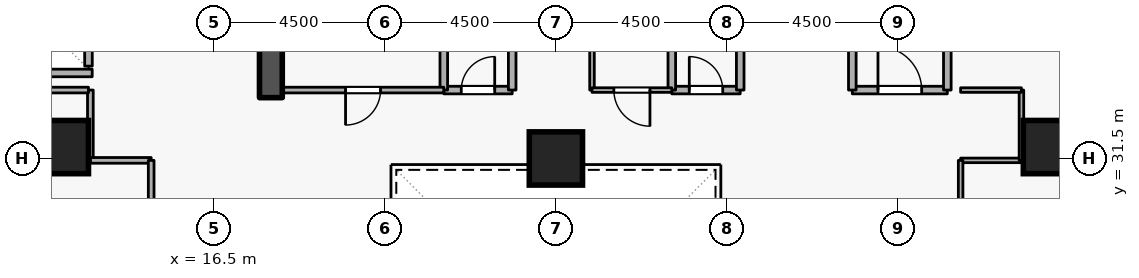
"""IFC4 building model, lengths in metres.
Left out: names, types, materials, properties, quantities, classifications, styles, units other than length and angle.
Written with IfcOpenShell. Run it as: python <this file> out.ifc"""

import sys

from ifc_helpers import new_model, si_unit, direction, frame, frame_2d, origin, origin_2d, place, context, subcontext, project, spatial, rectangle, extrude, element, fill, save


model = new_model("IFC4")
c1 = context("Model", 3, precision=1e-05, world=origin(), true_north=direction((0.0, 1.0)))
c2 = subcontext(c1, "Body", "Model", "MODEL_VIEW")
j1 = project(units=[si_unit("LENGTHUNIT", "METRE"), si_unit("PLANEANGLEUNIT", "RADIAN")], contexts=[c1])
p1 = place(None, origin())
s1 = spatial("IfcSite", under=j1, at=p1, CompositionType="ELEMENT")
p2 = place(p1, origin())
s2 = spatial("IfcBuilding", under=s1, at=p2, CompositionType="ELEMENT")
p3 = place(p2, frame((0.0, 0.0, 31.5)))
s3 = spatial("IfcBuildingStorey", under=s2, at=p3, CompositionType="ELEMENT", Elevation=31.5)
p4 = place(p3, frame((18.0, 33.1, 0.0), z_axis=(0.0, 0.0, 1.0), x_axis=(0.0, 1.0, 0.0)))
e1 = element("IfcWall", 1, at=p4, inside=s3, PredefinedType="SHEAR", context=c2, shape_type="SweptSolid", body=[
    extrude(rectangle(XDim=5.7, YDim=0.6, at=frame_2d((2.85, 0.0))), origin(), (0.0, 0.0, 1.0), 3.6),
])
for number, where, z_axis, x_axis in (
    (2, (12.5, 31.8, 0.0), (0.0, 0.0, 1.0), (1.0, 0.0, 0.0)),
    (3, (38.5, 31.8, 0.0), (0.0, 0.0, 1.0), (1.0, 0.0, 0.0)),
    (4, (25.5, 31.5, 0.0), (0.0, 0.0, 1.0), (1.0, 0.0, 0.0)),
):
    element("IfcColumn", number, at=place(p3, frame(where, z_axis=z_axis, x_axis=x_axis)), inside=s3, PredefinedType="COLUMN", context=c2, shape_type="SweptSolid", body=[
        extrude(rectangle(XDim=1.4, YDim=1.4, at=origin_2d()), origin(), (0.0, 0.0, 1.0), 3.6),
    ])
p5 = place(p3, frame((13.2, 33.93, 0.0), z_axis=(0.0, 0.0, 1.0), x_axis=(0.0, 1.0, 0.0)))
e5 = element("IfcWall", 5, at=p5, inside=s3, PredefinedType="STANDARD", context=c2, shape_type="SweptSolid", body=[
    extrude(rectangle(XDim=1.94, YDim=0.2, at=frame_2d((0.97, 0.0))), origin(), (0.0, 0.0, 1.0), 3.34),
])
p6 = place(p3, frame((11.002, 33.75, 0.0), z_axis=(0.0, 0.0, 1.0), x_axis=(1.0, 0.0, 0.0)))
e6 = element("IfcWall", 6, at=p6, inside=s3, PredefinedType="STANDARD", context=c2, shape_type="SweptSolid", body=[
    extrude(rectangle(XDim=2.296, YDim=0.2, at=frame_2d((1.148, 0.0))), origin(), (0.0, 0.0, 1.0), 3.34),
])
p7 = place(p3, frame((33.3, 33.3, 0.0), z_axis=(0.0, 0.0, 1.0), x_axis=(1.0, 0.0, 0.0)))
e7 = element("IfcWall", 7, at=p7, inside=s3, PredefinedType="STANDARD", context=c2, shape_type="SweptSolid", body=[
    extrude(rectangle(XDim=2.5, YDim=0.2, at=frame_2d((1.25, 0.0))), origin(), (0.0, 0.0, 1.0), 3.34),
])
p8 = place(p7, frame((0.675, 0.0, 0.0)))
e8 = element("IfcOpeningElement", 8, at=p8, cuts=e7, PredefinedType="OPENING", context=c2, shape_type="SweptSolid", body=[
    extrude(rectangle(XDim=1.15, YDim=2.1, at=frame_2d((0.575, 1.05))), frame((0.0, 0.11, 0.0), z_axis=(0.0, -1.0, 0.0), x_axis=(1.0, 0.0, 0.0)), (0.0, 0.0, 1.0), 0.22),
])
p9 = place(p3, frame((35.8, 33.3, 0.0), z_axis=(0.0, 0.0, 1.0), x_axis=(0.0, 1.0, 0.0)))
e9 = element("IfcWall", 9, at=p9, inside=s3, PredefinedType="STANDARD", context=c2, shape_type="SweptSolid", body=[
    extrude(rectangle(XDim=5.7, YDim=0.2, at=frame_2d((2.85, 0.0))), origin(), (0.0, 0.0, 1.0), 3.34),
])
p10 = place(p3, frame((33.3, 35.6, 0.0), z_axis=(0.0, 0.0, 1.0), x_axis=(0.0, -1.0, 0.0)))
e10 = element("IfcWall", 10, at=p10, inside=s3, PredefinedType="STANDARD", context=c2, shape_type="SweptSolid", body=[
    extrude(rectangle(XDim=2.3, YDim=0.2, at=frame_2d((1.15, 0.0))), origin(), (0.0, 0.0, 1.0), 2.545),
])
p11 = place(p3, frame((22.55, 33.3, 0.0), z_axis=(0.0, 0.0, 1.0), x_axis=(1.0, 0.0, 0.0)))
e11 = element("IfcWall", 11, at=p11, inside=s3, PredefinedType="STANDARD", context=c2, shape_type="SweptSolid", body=[
    extrude(rectangle(XDim=1.8, YDim=0.2, at=frame_2d((0.9, 0.0))), origin(), (0.0, 0.0, 1.0), 3.34),
])
p12 = place(p11, frame((0.46, 0.0, 0.0)))
e12 = element("IfcOpeningElement", 12, at=p12, cuts=e11, PredefinedType="OPENING", context=c2, shape_type="SweptSolid", body=[
    extrude(rectangle(XDim=0.88, YDim=2.04, at=frame_2d((0.44, 1.02))), frame((0.0, 0.11, 0.0), z_axis=(0.0, -1.0, 0.0), x_axis=(1.0, 0.0, 0.0)), (0.0, 0.0, 1.0), 0.22),
])
for number, where, z_axis, x_axis in (
    (13, (24.35, 33.3, 0.0), (0.0, 0.0, 1.0), (0.0, 1.0, 0.0)),
    (14, (22.55, 35.35, 0.0), (0.0, 0.0, 1.0), (0.0, -1.0, 0.0)),
):
    element("IfcWall", number, at=place(p3, frame(where, z_axis=z_axis, x_axis=x_axis)), inside=s3, PredefinedType="STANDARD", context=c2, shape_type="SweptSolid", body=[
        extrude(rectangle(XDim=2.05, YDim=0.2, at=frame_2d((1.025, 0.0))), origin(), (0.0, 0.0, 1.0), 3.34),
    ])
p13 = place(p3, frame((28.55, 33.3, 0.0), z_axis=(0.0, 0.0, 1.0), x_axis=(1.0, 0.0, 0.0)))
e15 = element("IfcWall", 15, at=p13, inside=s3, PredefinedType="STANDARD", context=c2, shape_type="SweptSolid", body=[
    extrude(rectangle(XDim=1.8, YDim=0.2, at=frame_2d((0.9, 0.0))), origin(), (0.0, 0.0, 1.0), 3.34),
])
p14 = place(p13, frame((0.46, 0.0, 0.0)))
e16 = element("IfcOpeningElement", 16, at=p14, cuts=e15, PredefinedType="OPENING", context=c2, shape_type="SweptSolid", body=[
    extrude(rectangle(XDim=0.88, YDim=2.04, at=frame_2d((0.44, 1.02))), frame((0.0, 0.11, 0.0), z_axis=(0.0, -1.0, 0.0), x_axis=(1.0, 0.0, 0.0)), (0.0, 0.0, 1.0), 0.22),
])
for number, where, z_axis, x_axis in (
    (17, (30.35, 33.3, 0.0), (0.0, 0.0, 1.0), (0.0, 1.0, 0.0)),
    (18, (28.55, 35.35, 0.0), (0.0, 0.0, 1.0), (0.0, -1.0, 0.0)),
):
    element("IfcWall", number, at=place(p3, frame(where, z_axis=z_axis, x_axis=x_axis)), inside=s3, PredefinedType="STANDARD", context=c2, shape_type="SweptSolid", body=[
        extrude(rectangle(XDim=2.05, YDim=0.2, at=frame_2d((1.025, 0.0))), origin(), (0.0, 0.0, 1.0), 3.34),
    ])
p15 = place(p3, frame((22.55, 33.3, 0.0), z_axis=(0.0, 0.0, 1.0), x_axis=(-1.0, 0.0, 0.0)))
e19 = element("IfcWall", 19, at=p15, inside=s3, PredefinedType="PARTITIONING", context=c2, shape_type="SweptSolid", body=[
    extrude(rectangle(XDim=4.25, YDim=0.15, at=frame_2d((2.125, 0.0))), origin(), (0.0, 0.0, 1.0), 3.34),
])
p16 = place(p15, frame((1.665, 0.0, 0.0)))
e20 = element("IfcOpeningElement", 20, at=p16, cuts=e19, PredefinedType="OPENING", context=c2, shape_type="SweptSolid", body=[
    extrude(rectangle(XDim=0.92, YDim=2.08, at=frame_2d((0.46, 1.04))), frame((0.0, 0.085, 0.0), z_axis=(0.0, -1.0, 0.0), x_axis=(1.0, 0.0, 0.0)), (0.0, 0.0, 1.0), 0.17),
])
p17 = place(p3, frame((26.45, 33.3, 0.0), z_axis=(0.0, 0.0, 1.0), x_axis=(0.0, 1.0, 0.0)))
e21 = element("IfcWall", 21, at=p17, inside=s3, PredefinedType="PARTITIONING", context=c2, shape_type="SweptSolid", body=[
    extrude(rectangle(XDim=2.05, YDim=0.12, at=frame_2d((1.025, 0.0))), origin(), (0.0, 0.0, 1.0), 3.34),
])
p18 = place(p3, frame((28.55, 33.3, 0.0), z_axis=(0.0, 0.0, 1.0), x_axis=(-1.0, 0.0, 0.0)))
e22 = element("IfcWall", 22, at=p18, inside=s3, PredefinedType="PARTITIONING", context=c2, shape_type="SweptSolid", body=[
    extrude(rectangle(XDim=2.1, YDim=0.12, at=frame_2d((1.05, 0.0))), origin(), (0.0, 0.0, 1.0), 3.34),
])
p19 = place(p18, frame((0.575, 0.0, 0.0)))
e23 = element("IfcOpeningElement", 23, at=p19, cuts=e22, PredefinedType="OPENING", context=c2, shape_type="SweptSolid", body=[
    extrude(rectangle(XDim=0.95, YDim=2.1, at=frame_2d((0.475, 1.05))), frame((0.0, 0.07, 0.0), z_axis=(0.0, -1.0, 0.0), x_axis=(1.0, 0.0, 0.0)), (0.0, 0.0, 1.0), 0.14),
])
p20 = place(p3, frame((13.25, 33.3, 0.0), z_axis=(0.0, 0.0, 1.0), x_axis=(0.0, -1.0, 0.0)))
e24 = element("IfcWall", 24, at=p20, inside=s3, PredefinedType="PARTITIONING", context=c2, shape_type="SweptSolid", body=[
    extrude(rectangle(XDim=1.85, YDim=0.15, at=frame_2d((0.925, 0.0))), origin(), (0.0, 0.0, 1.0), 3.34),
])
p21 = place(p3, frame((13.25, 31.45, 0.0), z_axis=(0.0, 0.0, 1.0), x_axis=(1.0, 0.0, 0.0)))
e25 = element("IfcWall", 25, at=p21, inside=s3, PredefinedType="PARTITIONING", context=c2, shape_type="SweptSolid", body=[
    extrude(rectangle(XDim=1.6, YDim=0.15, at=frame_2d((0.8, 0.0))), origin(), (0.0, 0.0, 1.0), 3.34),
])
p22 = place(p3, frame((14.85, 31.45, 0.0), z_axis=(0.0, 0.0, 1.0), x_axis=(0.0, -1.0, 0.0)))
e26 = element("IfcWall", 26, at=p22, inside=s3, PredefinedType="PARTITIONING", context=c2, shape_type="SweptSolid", body=[
    extrude(rectangle(XDim=4.45, YDim=0.15, at=frame_2d((2.225, 0.0))), origin(), (0.0, 0.0, 1.0), 3.34),
])
p23 = place(p22, frame((1.575, 0.0, 0.0)))
e27 = element("IfcOpeningElement", 27, at=p23, cuts=e26, PredefinedType="OPENING", context=c2, shape_type="SweptSolid", body=[
    extrude(rectangle(XDim=1.3, YDim=2.12, at=frame_2d((0.65, 1.06))), frame((0.0, 0.085, 0.0), z_axis=(0.0, -1.0, 0.0), x_axis=(1.0, 0.0, 0.0)), (0.0, 0.0, 1.0), 0.17),
])
p24 = place(p3, frame((10.9, 33.3, 0.0), z_axis=(0.0, 0.0, 1.0), x_axis=(1.0, 0.0, 0.0)))
e28 = element("IfcWall", 28, at=p24, inside=s3, PredefinedType="PARTITIONING", context=c2, shape_type="SweptSolid", body=[
    extrude(rectangle(XDim=2.3, YDim=0.15, at=frame_2d((1.15, 0.0))), origin(), (0.0, 0.0, 1.0), 3.34),
])
p25 = place(p3, frame((36.15, 31.45, 0.0), z_axis=(0.0, 0.0, 1.0), x_axis=(1.0, 0.0, 0.0)))
e29 = element("IfcWall", 29, at=p25, inside=s3, PredefinedType="PARTITIONING", context=c2, shape_type="SweptSolid", body=[
    extrude(rectangle(XDim=1.6, YDim=0.12, at=frame_2d((0.8, 0.0))), origin(), (0.0, 0.0, 1.0), 3.34),
])
p26 = place(p3, frame((37.75, 31.45, 0.0), z_axis=(0.0, 0.0, 1.0), x_axis=(0.0, 1.0, 0.0)))
e30 = element("IfcWall", 30, at=p26, inside=s3, PredefinedType="PARTITIONING", context=c2, shape_type="SweptSolid", body=[
    extrude(rectangle(XDim=1.85, YDim=0.12, at=frame_2d((0.925, 0.0))), origin(), (0.0, 0.0, 1.0), 3.34),
])
p27 = place(p3, frame((37.75, 33.3, 0.0), z_axis=(0.0, 0.0, 1.0), x_axis=(-1.0, 0.0, 0.0)))
e31 = element("IfcWall", 31, at=p27, inside=s3, PredefinedType="PARTITIONING", context=c2, shape_type="SweptSolid", body=[
    extrude(rectangle(XDim=1.6, YDim=0.12, at=frame_2d((0.8, 0.0))), origin(), (0.0, 0.0, 1.0), 3.34),
])
p28 = place(p3, frame((36.15, 27.0, 0.0), z_axis=(0.0, 0.0, 1.0), x_axis=(0.0, 1.0, 0.0)))
e32 = element("IfcWall", 32, at=p28, inside=s3, PredefinedType="PARTITIONING", context=c2, shape_type="SweptSolid", body=[
    extrude(rectangle(XDim=4.45, YDim=0.12, at=frame_2d((2.225, 0.0))), origin(), (0.0, 0.0, 1.0), 3.34),
])
p29 = place(p28, frame((1.7, 0.0, 0.0)))
e33 = element("IfcOpeningElement", 33, at=p29, cuts=e32, PredefinedType="OPENING", context=c2, shape_type="SweptSolid", body=[
    extrude(rectangle(XDim=1.05, YDim=2.1, at=frame_2d((0.525, 1.05))), frame((0.0, 0.07, 0.0), z_axis=(0.0, -1.0, 0.0), x_axis=(1.0, 0.0, 0.0)), (0.0, 0.0, 1.0), 0.14),
])
p30 = place(p8, origin())
e34 = element("IfcDoor", 34, at=p30, inside=s3, OperationType="SINGLE_SWING_LEFT", PredefinedType="DOOR", context=c2, shape_type="SweptSolid", body=[
    extrude(rectangle(XDim=1.15, YDim=2.1, at=frame_2d((0.575, 1.05))), frame((0.0, 0.025, 0.0), z_axis=(0.0, -1.0, 0.0), x_axis=(1.0, 0.0, 0.0)), (0.0, 0.0, 1.0), 0.05),
])
fill(e8, e34)
p31 = place(p12, origin())
e35 = element("IfcDoor", 35, at=p31, inside=s3, OperationType="SINGLE_SWING_RIGHT", PredefinedType="DOOR", context=c2, shape_type="SweptSolid", body=[
    extrude(rectangle(XDim=0.88, YDim=2.04, at=frame_2d((0.44, 1.02))), frame((0.0, 0.025, 0.0), z_axis=(0.0, -1.0, 0.0), x_axis=(1.0, 0.0, 0.0)), (0.0, 0.0, 1.0), 0.05),
])
fill(e12, e35)
p32 = place(p14, origin())
e36 = element("IfcDoor", 36, at=p32, inside=s3, OperationType="SINGLE_SWING_LEFT", PredefinedType="DOOR", context=c2, shape_type="SweptSolid", body=[
    extrude(rectangle(XDim=0.88, YDim=2.04, at=frame_2d((0.44, 1.02))), frame((0.0, 0.025, 0.0), z_axis=(0.0, -1.0, 0.0), x_axis=(1.0, 0.0, 0.0)), (0.0, 0.0, 1.0), 0.05),
])
fill(e16, e36)
p33 = place(p16, origin())
e37 = element("IfcDoor", 37, at=p33, inside=s3, OperationType="SINGLE_SWING_RIGHT", PredefinedType="DOOR", context=c2, shape_type="SweptSolid", body=[
    extrude(rectangle(XDim=0.92, YDim=2.08, at=frame_2d((0.46, 1.04))), frame((0.0, 0.025, 0.0), z_axis=(0.0, -1.0, 0.0), x_axis=(1.0, 0.0, 0.0)), (0.0, 0.0, 1.0), 0.05),
])
fill(e20, e37)
p34 = place(p19, origin())
e38 = element("IfcDoor", 38, at=p34, inside=s3, OperationType="SINGLE_SWING_LEFT", PredefinedType="DOOR", context=c2, shape_type="SweptSolid", body=[
    extrude(rectangle(XDim=0.95, YDim=2.1, at=frame_2d((0.475, 1.05))), frame((0.0, 0.025, 0.0), z_axis=(0.0, -1.0, 0.0), x_axis=(1.0, 0.0, 0.0)), (0.0, 0.0, 1.0), 0.05),
])
fill(e23, e38)
save(model, sys.argv[1])
